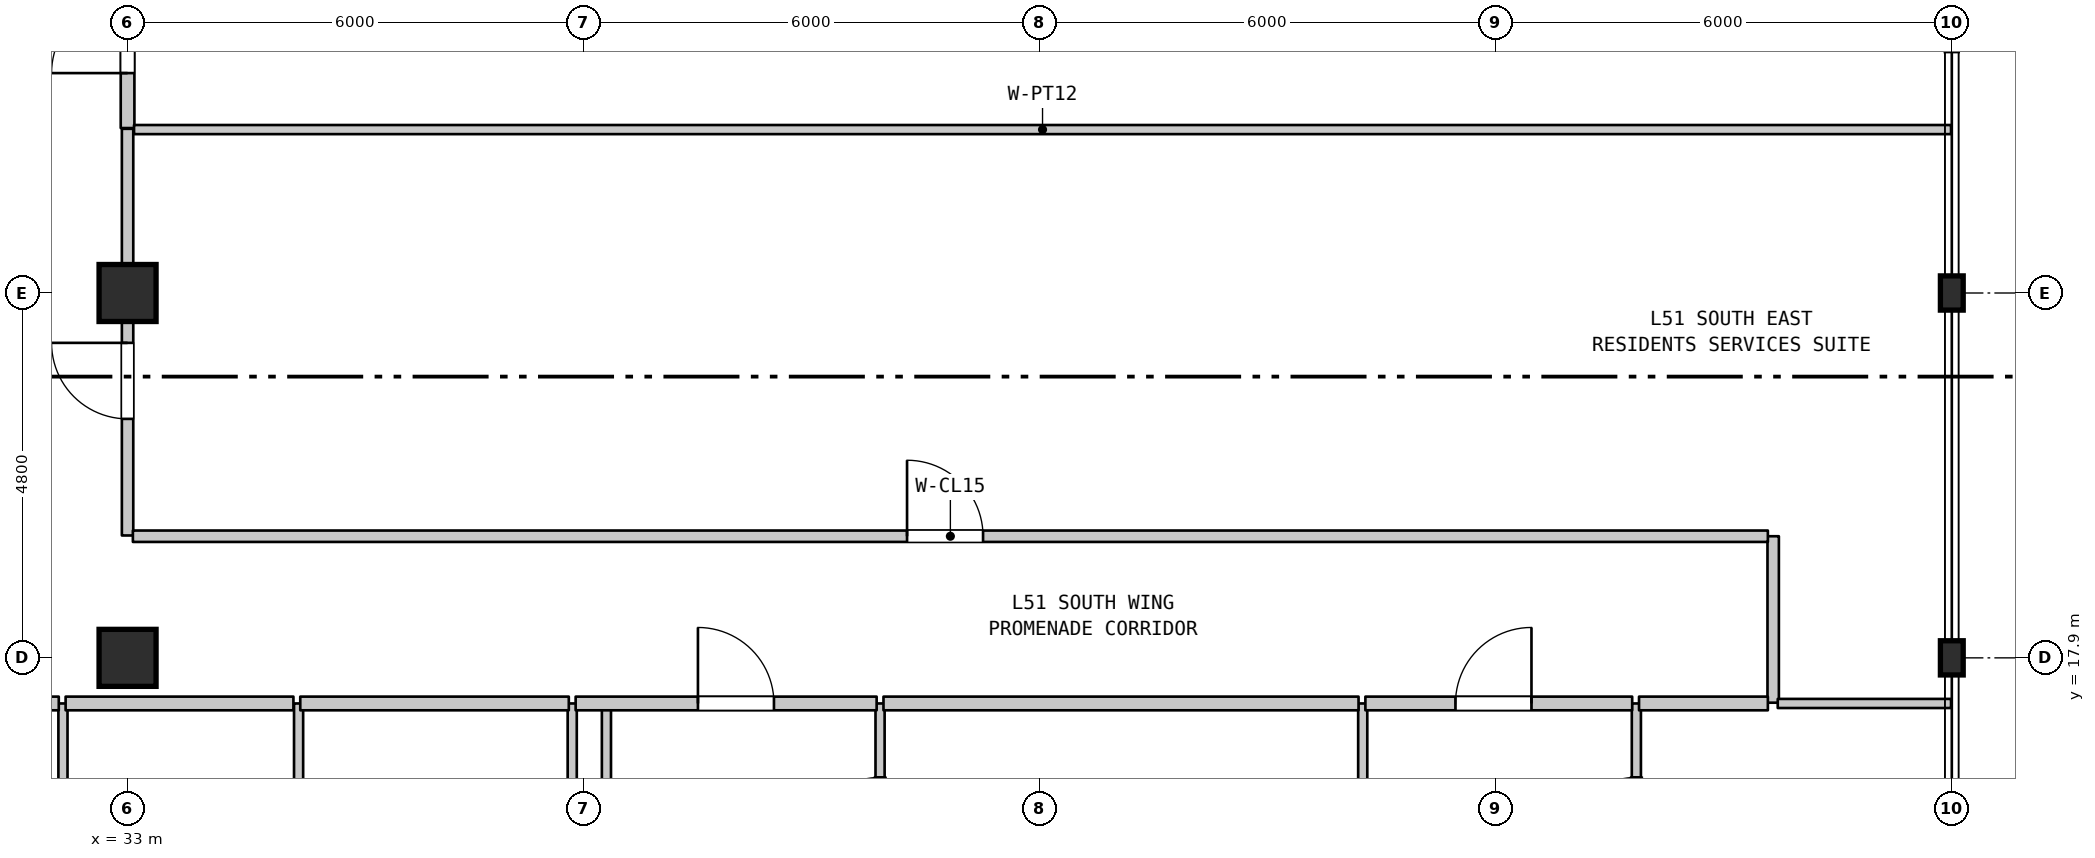
"""IFC4 building model, lengths in metres.
Left out: names, types, materials, properties, quantities, classifications, styles, units other than length and angle.
Written with IfcOpenShell. Run it as: python <this file> out.ifc"""

import sys

from ifc_helpers import new_model, si_unit, direction, frame, frame_2d, origin, origin_2d, place, context, subcontext, project, spatial, rectangle, i_section, extrude, element, fill, save


model = new_model("IFC4")
c1 = context("Model", 3, precision=1e-05, world=origin(), true_north=direction((0.0, 1.0)))
c2 = subcontext(c1, "Body", "Model", "MODEL_VIEW")
j1 = project(units=[si_unit("LENGTHUNIT", "METRE"), si_unit("PLANEANGLEUNIT", "RADIAN")], contexts=[c1])
p1 = place(None, origin())
s1 = spatial("IfcSite", under=j1, at=p1, CompositionType="ELEMENT")
p2 = place(p1, origin())
s2 = spatial("IfcBuilding", under=s1, at=p2, CompositionType="ELEMENT")
p3 = place(p2, frame((0.0, 0.0, 206.9)))
s3 = spatial("IfcBuildingStorey", under=s2, at=p3, CompositionType="ELEMENT", Elevation=206.9)
for number, where, z_axis, x_axis in (
    (1, (33.0, 17.9, 0.0), (0.0, 0.0, 1.0), (1.0, 0.0, 0.0)),
    (2, (33.0, 22.7, 0.0), (0.0, 0.0, 1.0), (1.0, 0.0, 0.0)),
):
    element("IfcColumn", number, at=place(p3, frame(where, z_axis=z_axis, x_axis=x_axis)), inside=s3, PredefinedType="COLUMN", context=c2, shape_type="SweptSolid", body=[
        extrude(rectangle(XDim=0.75, YDim=0.75, at=origin_2d()), origin(), (0.0, 0.0, 1.0), 3.7),
    ])
for number, where, z_axis, x_axis in (
    (3, (57.0, 17.9, 0.0), (0.0, 0.0, 1.0), (1.0, 0.0, 0.0)),
    (4, (57.0, 22.7, 0.0), (0.0, 0.0, 1.0), (1.0, 0.0, 0.0)),
):
    element("IfcColumn", number, at=place(p3, frame(where, z_axis=z_axis, x_axis=x_axis)), inside=s3, PredefinedType="COLUMN", context=c2, shape_type="SweptSolid", body=[
        extrude(i_section(OverallWidth=0.3, OverallDepth=0.45, WebThickness=0.014, FlangeThickness=0.026, FilletRadius=0.027, at=origin_2d()), origin(), (0.0, 0.0, 1.0), 3.7),
    ])
p4 = place(p3, frame((32.15, 11.15, 0.0), z_axis=(0.0, 0.0, 1.0), x_axis=(0.0, 1.0, 0.0)))
e5 = element("IfcWall", 5, at=p4, inside=s3, PredefinedType="PARTITIONING", context=c2, shape_type="SweptSolid", body=[
    extrude(rectangle(XDim=6.15, YDim=0.12, at=frame_2d((3.075, 0.0))), origin(), (0.0, 0.0, 1.0), 3.39),
])
p5 = place(p3, frame((33.0, 19.51, 0.0), z_axis=(0.0, 0.0, 1.0), x_axis=(0.0, 1.0, 0.0)))
e6 = element("IfcWall", 6, at=p5, inside=s3, PredefinedType="STANDARD", context=c2, shape_type="SweptSolid", body=[
    extrude(rectangle(XDim=5.35, YDim=0.15, at=frame_2d((2.675, 0.0))), origin(), (0.0, 0.0, 1.0), 2.99),
])
p6 = place(p5, frame((1.534, 0.0, 0.0)))
e7 = element("IfcOpeningElement", 7, at=p6, cuts=e6, PredefinedType="OPENING", context=c2, shape_type="SweptSolid", body=[
    extrude(rectangle(XDim=1.0, YDim=2.15, at=frame_2d((0.5, 1.075))), frame((0.0, 0.085, 0.0), z_axis=(0.0, -1.0, 0.0), x_axis=(1.0, 0.0, 0.0)), (0.0, 0.0, 1.0), 0.17),
])
p7 = place(p3, frame((33.0, 24.87, 0.0), z_axis=(0.0, 0.0, 1.0), x_axis=(0.0, 1.0, 0.0)))
e8 = element("IfcWall", 8, at=p7, inside=s3, PredefinedType="STANDARD", context=c2, shape_type="SweptSolid", body=[
    extrude(rectangle(XDim=2.6, YDim=0.18, at=frame_2d((1.3, 0.0))), origin(), (0.0, 0.0, 1.0), 2.99),
])
p8 = place(p7, frame((0.723, 0.0, 0.0)))
e9 = element("IfcOpeningElement", 9, at=p8, cuts=e8, PredefinedType="OPENING", context=c2, shape_type="SweptSolid", body=[
    extrude(rectangle(XDim=1.0, YDim=2.15, at=frame_2d((0.5, 1.075))), frame((0.0, 0.1, 0.0), z_axis=(0.0, -1.0, 0.0), x_axis=(1.0, 0.0, 0.0)), (0.0, 0.0, 1.0), 0.2),
])
for number, where, z_axis, x_axis in (
    (10, (35.25, 11.15, 0.0), (0.0, 0.0, 1.0), (0.0, 1.0, 0.0)),
    (11, (38.85, 11.15, 0.0), (0.0, 0.0, 1.0), (0.0, 1.0, 0.0)),
):
    element("IfcWall", number, at=place(p3, frame(where, z_axis=z_axis, x_axis=x_axis)), inside=s3, PredefinedType="PARTITIONING", context=c2, shape_type="SweptSolid", body=[
        extrude(rectangle(XDim=6.15, YDim=0.12, at=frame_2d((3.075, 0.0))), origin(), (0.0, 0.0, 1.0), 3.39),
    ])
p9 = place(p3, frame((39.3, 0.71, 0.0), z_axis=(0.0, 0.0, 1.0), x_axis=(0.0, 1.0, 0.0)))
e12 = element("IfcWall", 12, at=p9, inside=s3, PredefinedType="PARTITIONING", context=c2, shape_type="SweptSolid", body=[
    extrude(rectangle(XDim=16.59, YDim=0.12, at=frame_2d((8.295, 0.0))), origin(), (0.0, 0.0, 1.0), 3.39),
])
p10 = place(p3, frame((42.9, 14.6, 0.0), z_axis=(0.0, 0.0, 1.0), x_axis=(0.0, 1.0, 0.0)))
e13 = element("IfcWall", 13, at=p10, inside=s3, PredefinedType="PARTITIONING", context=c2, shape_type="SweptSolid", body=[
    extrude(rectangle(XDim=2.7, YDim=0.12, at=frame_2d((1.35, 0.0))), origin(), (0.0, 0.0, 1.0), 3.39),
])
p11 = place(p10, frame((0.828, 0.0, 0.0)))
e14 = element("IfcOpeningElement", 14, at=p11, cuts=e13, PredefinedType="OPENING", context=c2, shape_type="SweptSolid", body=[
    extrude(rectangle(XDim=0.9, YDim=2.1, at=frame_2d((0.45, 1.05))), frame((0.0, 0.07, 0.0), z_axis=(0.0, -1.0, 0.0), x_axis=(1.0, 0.0, 0.0)), (0.0, 0.0, 1.0), 0.14),
])
p12 = place(p3, frame((49.25, 14.6, 0.0), z_axis=(0.0, 0.0, 1.0), x_axis=(0.0, 1.0, 0.0)))
e15 = element("IfcWall", 15, at=p12, inside=s3, PredefinedType="PARTITIONING", context=c2, shape_type="SweptSolid", body=[
    extrude(rectangle(XDim=2.7, YDim=0.12, at=frame_2d((1.35, 0.0))), origin(), (0.0, 0.0, 1.0), 3.39),
])
p13 = place(p3, frame((52.85, 14.6, 0.0), z_axis=(0.0, 0.0, 1.0), x_axis=(0.0, 1.0, 0.0)))
e16 = element("IfcWall", 16, at=p13, inside=s3, PredefinedType="PARTITIONING", context=c2, shape_type="SweptSolid", body=[
    extrude(rectangle(XDim=2.7, YDim=0.12, at=frame_2d((1.35, 0.0))), origin(), (0.0, 0.0, 1.0), 3.39),
])
p14 = place(p13, frame((0.828, 0.0, 0.0)))
e17 = element("IfcOpeningElement", 17, at=p14, cuts=e16, PredefinedType="OPENING", context=c2, shape_type="SweptSolid", body=[
    extrude(rectangle(XDim=0.9, YDim=2.1, at=frame_2d((0.45, 1.05))), frame((0.0, 0.07, 0.0), z_axis=(0.0, -1.0, 0.0), x_axis=(1.0, 0.0, 0.0)), (0.0, 0.0, 1.0), 0.14),
])
p15 = place(p3, frame((54.65, 17.31, 0.0), z_axis=(0.0, 0.0, 1.0), x_axis=(0.0, 1.0, 0.0)))
e18 = element("IfcWall", 18, at=p15, inside=s3, PredefinedType="STANDARD", context=c2, shape_type="SweptSolid", body=[
    extrude(rectangle(XDim=2.19, YDim=0.15, at=frame_2d((1.095, 0.0))), origin(), (0.0, 0.0, 1.0), 3.39),
])
p16 = place(p3, frame((27.645, 17.3, 0.0), z_axis=(0.0, 0.0, 1.0), x_axis=(1.0, 0.0, 0.0)))
e19 = element("IfcWall", 19, at=p16, inside=s3, PredefinedType="STANDARD", context=c2, shape_type="SweptSolid", body=[
    extrude(rectangle(XDim=4.45, YDim=0.18, at=frame_2d((2.225, 0.0))), origin(), (0.0, 0.0, 1.0), 3.39),
])
p17 = place(p16, frame((1.653, 0.0, 0.0)))
e20 = element("IfcOpeningElement", 20, at=p17, cuts=e19, PredefinedType="OPENING", context=c2, shape_type="SweptSolid", body=[
    extrude(rectangle(XDim=1.0, YDim=2.15, at=frame_2d((0.5, 1.075))), frame((0.0, 0.1, 0.0), z_axis=(0.0, -1.0, 0.0), x_axis=(1.0, 0.0, 0.0)), (0.0, 0.0, 1.0), 0.2),
])
p18 = place(p3, frame((32.185, 17.3, 0.0), z_axis=(0.0, 0.0, 1.0), x_axis=(1.0, 0.0, 0.0)))
e21 = element("IfcWall", 21, at=p18, inside=s3, PredefinedType="STANDARD", context=c2, shape_type="SweptSolid", body=[
    extrude(rectangle(XDim=2.997, YDim=0.18, at=frame_2d((1.499, 0.0))), origin(), (0.0, 0.0, 1.0), 3.39),
])
p19 = place(p3, frame((35.272, 17.3, 0.0), z_axis=(0.0, 0.0, 1.0), x_axis=(1.0, 0.0, 0.0)))
e22 = element("IfcWall", 22, at=p19, inside=s3, PredefinedType="STANDARD", context=c2, shape_type="SweptSolid", body=[
    extrude(rectangle(XDim=3.533, YDim=0.18, at=frame_2d((1.767, 0.0))), origin(), (0.0, 0.0, 1.0), 3.39),
])
p20 = place(p3, frame((38.895, 17.3, 0.0), z_axis=(0.0, 0.0, 1.0), x_axis=(1.0, 0.0, 0.0)))
e23 = element("IfcWall", 23, at=p20, inside=s3, PredefinedType="STANDARD", context=c2, shape_type="SweptSolid", body=[
    extrude(rectangle(XDim=3.96, YDim=0.18, at=frame_2d((1.98, 0.0))), origin(), (0.0, 0.0, 1.0), 3.39),
])
p21 = place(p20, frame((1.609, 0.0, 0.0)))
e24 = element("IfcOpeningElement", 24, at=p21, cuts=e23, PredefinedType="OPENING", context=c2, shape_type="SweptSolid", body=[
    extrude(rectangle(XDim=1.0, YDim=2.15, at=frame_2d((0.5, 1.075))), frame((0.0, 0.1, 0.0), z_axis=(0.0, -1.0, 0.0), x_axis=(1.0, 0.0, 0.0)), (0.0, 0.0, 1.0), 0.2),
])
p22 = place(p3, frame((42.945, 17.3, 0.0), z_axis=(0.0, 0.0, 1.0), x_axis=(1.0, 0.0, 0.0)))
e25 = element("IfcWall", 25, at=p22, inside=s3, PredefinedType="STANDARD", context=c2, shape_type="SweptSolid", body=[
    extrude(rectangle(XDim=6.25, YDim=0.18, at=frame_2d((3.125, 0.0))), origin(), (0.0, 0.0, 1.0), 3.39),
])
p23 = place(p3, frame((49.285, 17.3, 0.0), z_axis=(0.0, 0.0, 1.0), x_axis=(1.0, 0.0, 0.0)))
e26 = element("IfcWall", 26, at=p23, inside=s3, PredefinedType="STANDARD", context=c2, shape_type="SweptSolid", body=[
    extrude(rectangle(XDim=3.51, YDim=0.18, at=frame_2d((1.755, 0.0))), origin(), (0.0, 0.0, 1.0), 3.39),
])
p24 = place(p23, frame((1.185, 0.0, 0.0)))
e27 = element("IfcOpeningElement", 27, at=p24, cuts=e26, PredefinedType="OPENING", context=c2, shape_type="SweptSolid", body=[
    extrude(rectangle(XDim=1.0, YDim=2.15, at=frame_2d((0.5, 1.075))), frame((0.0, 0.1, 0.0), z_axis=(0.0, -1.0, 0.0), x_axis=(1.0, 0.0, 0.0)), (0.0, 0.0, 1.0), 0.2),
])
p25 = place(p3, frame((52.885, 17.3, 0.0), z_axis=(0.0, 0.0, 1.0), x_axis=(1.0, 0.0, 0.0)))
e28 = element("IfcWall", 28, at=p25, inside=s3, PredefinedType="STANDARD", context=c2, shape_type="SweptSolid", body=[
    extrude(rectangle(XDim=1.695, YDim=0.18, at=frame_2d((0.848, 0.0))), origin(), (0.0, 0.0, 1.0), 3.39),
])
p26 = place(p3, frame((54.71, 17.3, 0.0), z_axis=(0.0, 0.0, 1.0), x_axis=(1.0, 0.0, 0.0)))
e29 = element("IfcWall", 29, at=p26, inside=s3, PredefinedType="PARTITIONING", context=c2, shape_type="SweptSolid", body=[
    extrude(rectangle(XDim=2.28, YDim=0.12, at=frame_2d((1.14, 0.0))), origin(), (0.0, 0.0, 1.0), 3.39),
])
p27 = place(p3, frame((33.07, 19.5, 0.0), z_axis=(0.0, 0.0, 1.0), x_axis=(1.0, 0.0, 0.0)))
e30 = element("IfcWall", 30, at=p27, inside=s3, PredefinedType="STANDARD", context=c2, shape_type="SweptSolid", body=[
    extrude(rectangle(XDim=21.51, YDim=0.15, at=frame_2d((10.755, 0.0))), origin(), (0.0, 0.0, 1.0), 3.39),
])
p28 = place(p27, frame((10.185, 0.0, 0.0)))
e31 = element("IfcOpeningElement", 31, at=p28, cuts=e30, PredefinedType="OPENING", context=c2, shape_type="SweptSolid", body=[
    extrude(rectangle(XDim=1.0, YDim=2.15, at=frame_2d((0.5, 1.075))), frame((0.0, 0.085, 0.0), z_axis=(0.0, -1.0, 0.0), x_axis=(1.0, 0.0, 0.0)), (0.0, 0.0, 1.0), 0.17),
])
p29 = place(p3, frame((33.085, 24.85, 0.0), z_axis=(0.0, 0.0, 1.0), x_axis=(1.0, 0.0, 0.0)))
e32 = element("IfcWall", 32, at=p29, inside=s3, PredefinedType="PARTITIONING", context=c2, shape_type="SweptSolid", body=[
    extrude(rectangle(XDim=23.905, YDim=0.12, at=frame_2d((11.953, 0.0))), origin(), (0.0, 0.0, 1.0), 3.39),
])
p30 = place(p6, origin())
e33 = element("IfcDoor", 33, at=p30, inside=s3, OperationType="SINGLE_SWING_RIGHT", PredefinedType="DOOR", context=c2, shape_type="SweptSolid", body=[
    extrude(rectangle(XDim=1.0, YDim=2.15, at=frame_2d((0.5, 1.075))), frame((0.0, 0.025, 0.0), z_axis=(0.0, -1.0, 0.0), x_axis=(1.0, 0.0, 0.0)), (0.0, 0.0, 1.0), 0.05),
])
fill(e7, e33)
p31 = place(p8, origin())
e34 = element("IfcDoor", 34, at=p31, inside=s3, OperationType="SINGLE_SWING_LEFT", PredefinedType="DOOR", context=c2, shape_type="SweptSolid", body=[
    extrude(rectangle(XDim=1.0, YDim=2.15, at=frame_2d((0.5, 1.075))), frame((0.0, 0.025, 0.0), z_axis=(0.0, -1.0, 0.0), x_axis=(1.0, 0.0, 0.0)), (0.0, 0.0, 1.0), 0.05),
])
fill(e9, e34)
p32 = place(p11, origin())
e35 = element("IfcDoor", 35, at=p32, inside=s3, OperationType="SINGLE_SWING_LEFT", PredefinedType="DOOR", context=c2, shape_type="SweptSolid", body=[
    extrude(rectangle(XDim=0.9, YDim=2.1, at=frame_2d((0.45, 1.05))), frame((0.0, 0.025, 0.0), z_axis=(0.0, -1.0, 0.0), x_axis=(1.0, 0.0, 0.0)), (0.0, 0.0, 1.0), 0.05),
])
fill(e14, e35)
p33 = place(p14, origin())
e36 = element("IfcDoor", 36, at=p33, inside=s3, OperationType="SINGLE_SWING_LEFT", PredefinedType="DOOR", context=c2, shape_type="SweptSolid", body=[
    extrude(rectangle(XDim=0.9, YDim=2.1, at=frame_2d((0.45, 1.05))), frame((0.0, 0.025, 0.0), z_axis=(0.0, -1.0, 0.0), x_axis=(1.0, 0.0, 0.0)), (0.0, 0.0, 1.0), 0.05),
])
fill(e17, e36)
p34 = place(p21, origin())
e37 = element("IfcDoor", 37, at=p34, inside=s3, OperationType="SINGLE_SWING_LEFT", PredefinedType="DOOR", context=c2, shape_type="SweptSolid", body=[
    extrude(rectangle(XDim=1.0, YDim=2.15, at=frame_2d((0.5, 1.075))), frame((0.0, 0.025, 0.0), z_axis=(0.0, -1.0, 0.0), x_axis=(1.0, 0.0, 0.0)), (0.0, 0.0, 1.0), 0.05),
])
fill(e24, e37)
p35 = place(p24, origin())
e38 = element("IfcDoor", 38, at=p35, inside=s3, OperationType="SINGLE_SWING_RIGHT", PredefinedType="DOOR", context=c2, shape_type="SweptSolid", body=[
    extrude(rectangle(XDim=1.0, YDim=2.15, at=frame_2d((0.5, 1.075))), frame((0.0, 0.025, 0.0), z_axis=(0.0, -1.0, 0.0), x_axis=(1.0, 0.0, 0.0)), (0.0, 0.0, 1.0), 0.05),
])
fill(e27, e38)
p36 = place(p28, origin())
e39 = element("IfcDoor", 39, at=p36, inside=s3, OperationType="SINGLE_SWING_LEFT", PredefinedType="DOOR", context=c2, shape_type="SweptSolid", body=[
    extrude(rectangle(XDim=1.0, YDim=2.15, at=frame_2d((0.5, 1.075))), frame((0.0, 0.025, 0.0), z_axis=(0.0, -1.0, 0.0), x_axis=(1.0, 0.0, 0.0)), (0.0, 0.0, 1.0), 0.05),
])
fill(e31, e39)
save(model, sys.argv[1])
